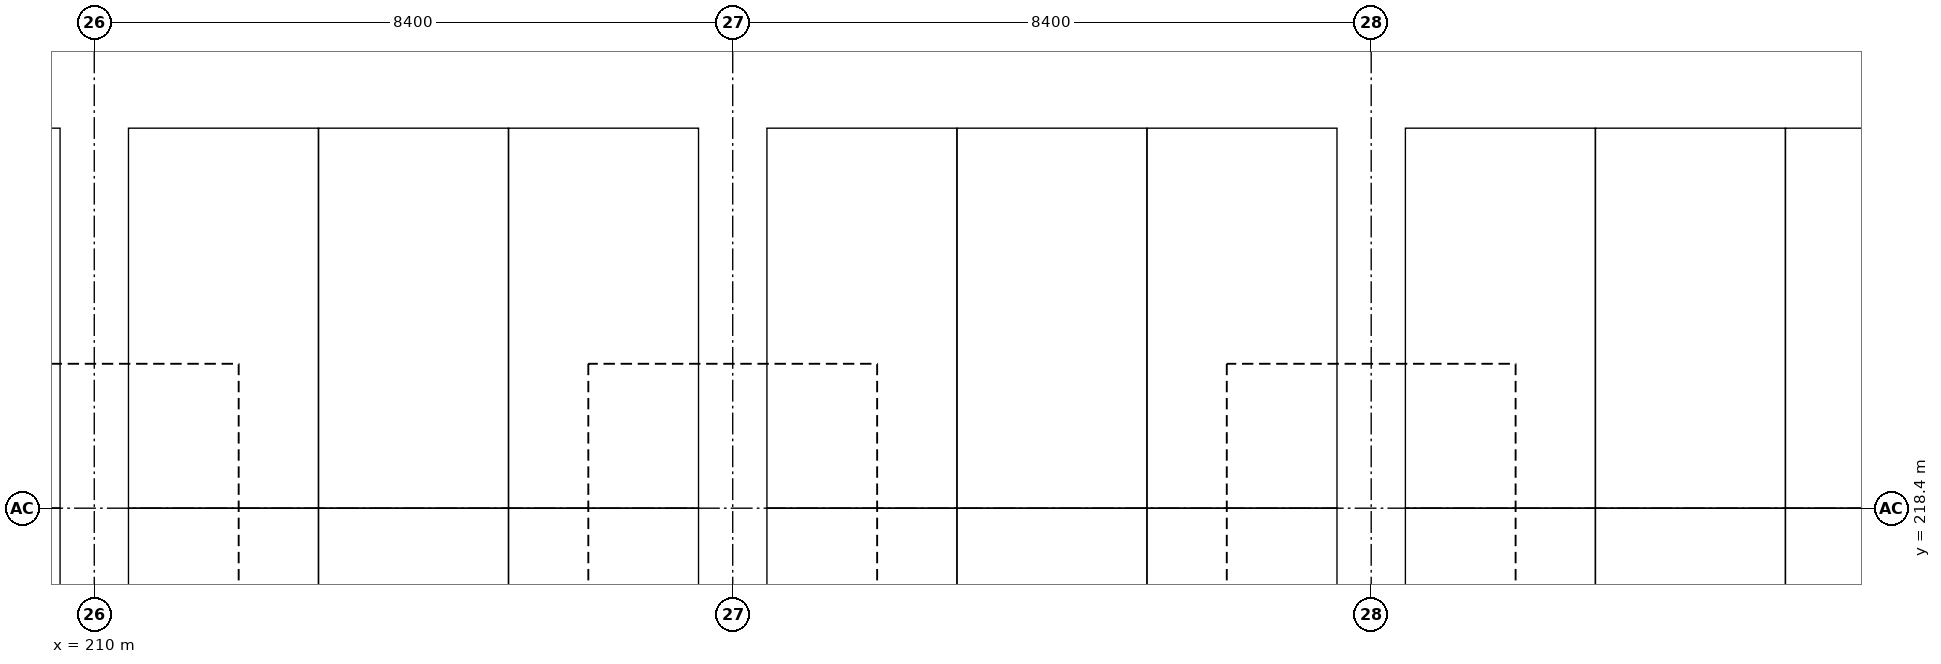
"""IFC4 building model, lengths in metres.
Left out: names, types, materials, properties, quantities, classifications, styles, units other than length and angle.
Written with IfcOpenShell. Run it as: python <this file> out.ifc"""

import sys

from ifc_helpers import new_model, si_unit, direction, frame, origin, origin_2d, place, context, subcontext, project, spatial, rectangle, extrude, element, save


model = new_model("IFC4")
c1 = context("Model", 3, precision=1e-05, world=origin(), true_north=direction((0.0, 1.0)))
c2 = subcontext(c1, "Body", "Model", "MODEL_VIEW")
j1 = project(units=[si_unit("LENGTHUNIT", "METRE"), si_unit("PLANEANGLEUNIT", "RADIAN")], contexts=[c1])
p1 = place(None, origin())
s1 = spatial("IfcSite", under=j1, at=p1, CompositionType="ELEMENT")
p2 = place(p1, origin())
s2 = spatial("IfcBuilding", under=s1, at=p2, CompositionType="ELEMENT")
p3 = place(p2, frame((0.0, 0.0, -3.0)))
s3 = spatial("IfcBuildingStorey", under=s2, at=p3, CompositionType="ELEMENT", Elevation=-3.0)
for number, where, z_axis, x_axis in (
    (1, (210.0, 218.4, 0.0), (0.0, 0.0, 1.0), (1.0, 0.0, 0.0)),
    (2, (218.4, 218.4, 0.0), (0.0, 0.0, 1.0), (1.0, 0.0, 0.0)),
    (3, (226.8, 218.4, 0.0), (0.0, 0.0, 1.0), (1.0, 0.0, 0.0)),
):
    element("IfcColumn", number, at=place(p3, frame(where, z_axis=z_axis, x_axis=x_axis)), inside=s3, PredefinedType="COLUMN", context=c2, shape_type="SweptSolid", body=[
        extrude(rectangle(XDim=0.8, YDim=0.8, at=origin_2d()), origin(), (0.0, 0.0, 1.0), 2.4),
    ])
save(model, sys.argv[1])
